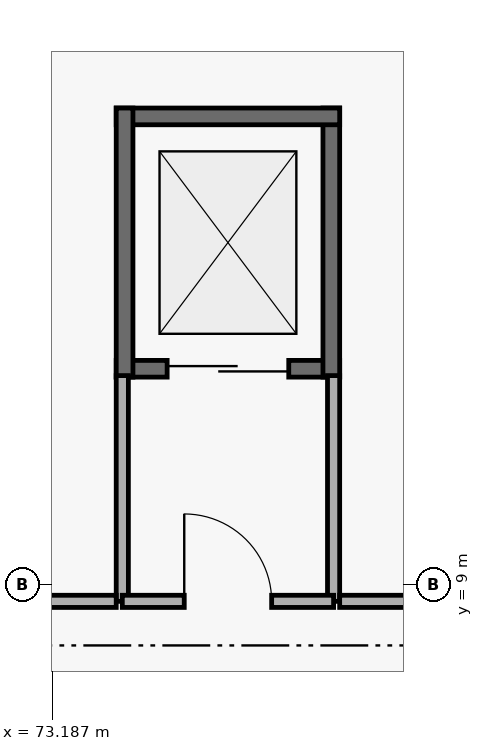
"""IFC4 building model, lengths in metres.
Left out: names, types, materials, properties, quantities, classifications, styles, units other than length and angle.
Written with IfcOpenShell. Run it as: python <this file> out.ifc"""

import sys

from ifc_helpers import new_model, si_unit, direction, frame, frame_2d, origin, place, context, subcontext, project, spatial, rectangle, extrude, element, fill, save


model = new_model("IFC4")
c1 = context("Model", 3, precision=1e-05, world=origin(), true_north=direction((0.0, 1.0)))
c2 = subcontext(c1, "Body", "Model", "MODEL_VIEW")
j1 = project(units=[si_unit("LENGTHUNIT", "METRE"), si_unit("PLANEANGLEUNIT", "RADIAN")], contexts=[c1])
p1 = place(None, origin())
s1 = spatial("IfcSite", under=j1, at=p1, CompositionType="ELEMENT")
p2 = place(p1, origin())
s2 = spatial("IfcBuilding", under=s1, at=p2, CompositionType="ELEMENT")
p3 = place(p2, origin())
s3 = spatial("IfcBuildingStorey", under=s2, at=p3, CompositionType="ELEMENT", Elevation=0.0)
p4 = place(p3, frame((74.03, 11.84, 0.0), z_axis=(0.0, 0.0, 1.0), x_axis=(1.0, 0.0, 0.0)))
e1 = element("IfcWall", 1, at=p4, inside=s3, PredefinedType="SHEAR", context=c2, shape_type="SweptSolid", body=[
    extrude(rectangle(XDim=2.94, YDim=0.22, at=frame_2d((1.47, 0.0))), origin(), (0.0, 0.0, 1.0), 5.1),
])
p5 = place(p4, frame((0.67, 0.0, 0.0)))
e2 = element("IfcOpeningElement", 2, at=p5, cuts=e1, PredefinedType="OPENING", context=c2, shape_type="SweptSolid", body=[
    extrude(rectangle(XDim=1.6, YDim=2.3, at=frame_2d((0.8, 1.15))), frame((0.0, 0.12, 0.0), z_axis=(0.0, -1.0, 0.0), x_axis=(1.0, 0.0, 0.0)), (0.0, 0.0, 1.0), 0.24),
])
p6 = place(p3, frame((76.86, 11.73, 0.0), z_axis=(0.0, 0.0, 1.0), x_axis=(0.0, 1.0, 0.0)))
e3 = element("IfcWall", 3, at=p6, inside=s3, PredefinedType="SHEAR", context=c2, shape_type="SweptSolid", body=[
    extrude(rectangle(XDim=3.54, YDim=0.22, at=frame_2d((1.77, 0.0))), origin(), (0.0, 0.0, 1.0), 5.1),
])
p7 = place(p3, frame((76.97, 15.16, 0.0), z_axis=(0.0, 0.0, 1.0), x_axis=(-1.0, 0.0, 0.0)))
e4 = element("IfcWall", 4, at=p7, inside=s3, PredefinedType="SHEAR", context=c2, shape_type="SweptSolid", body=[
    extrude(rectangle(XDim=2.94, YDim=0.22, at=frame_2d((1.47, 0.0))), origin(), (0.0, 0.0, 1.0), 5.1),
])
p8 = place(p3, frame((74.14, 15.27, 0.0), z_axis=(0.0, 0.0, 1.0), x_axis=(0.0, -1.0, 0.0)))
e5 = element("IfcWall", 5, at=p8, inside=s3, PredefinedType="SHEAR", context=c2, shape_type="SweptSolid", body=[
    extrude(rectangle(XDim=3.54, YDim=0.22, at=frame_2d((1.77, 0.0))), origin(), (0.0, 0.0, 1.0), 5.1),
])
for number, where, z_axis, x_axis in (
    (6, (74.11, 11.75, 0.0), (0.0, 0.0, 1.0), (0.0, -1.0, 0.0)),
    (7, (76.89, 11.75, 0.0), (0.0, 0.0, 1.0), (0.0, -1.0, 0.0)),
):
    element("IfcWall", number, at=place(p3, frame(where, z_axis=z_axis, x_axis=x_axis)), inside=s3, PredefinedType="PARTITIONING", context=c2, shape_type="SweptSolid", body=[
        extrude(rectangle(XDim=2.97, YDim=0.16, at=frame_2d((1.485, 0.0))), origin(), (0.0, 0.0, 1.0), 4.384),
    ])
p9 = place(p3, frame((74.11, 8.78, 0.0), z_axis=(0.0, 0.0, 1.0), x_axis=(1.0, 0.0, 0.0)))
e8 = element("IfcWall", 8, at=p9, inside=s3, PredefinedType="PARTITIONING", context=c2, shape_type="SweptSolid", body=[
    extrude(rectangle(XDim=2.78, YDim=0.16, at=frame_2d((1.39, 0.0))), origin(), (0.0, 0.0, 1.0), 4.384),
])
p10 = place(p9, frame((0.815, 0.0, 0.0)))
e9 = element("IfcOpeningElement", 9, at=p10, cuts=e8, PredefinedType="OPENING", context=c2, shape_type="SweptSolid", body=[
    extrude(rectangle(XDim=1.15, YDim=2.2, at=frame_2d((0.575, 1.1))), frame((0.0, 0.09, 0.0), z_axis=(0.0, -1.0, 0.0), x_axis=(1.0, 0.0, 0.0)), (0.0, 0.0, 1.0), 0.18),
])
p11 = place(p3, frame((71.55, 8.78, 0.0), z_axis=(0.0, 0.0, 1.0), x_axis=(1.0, 0.0, 0.0)))
e10 = element("IfcWall", 10, at=p11, inside=s3, PredefinedType="PARTITIONING", context=c2, shape_type="SweptSolid", body=[
    extrude(rectangle(XDim=2.48, YDim=0.16, at=frame_2d((1.24, 0.0))), origin(), (0.0, 0.0, 1.0), 4.384),
])
p12 = place(p3, frame((76.97, 8.78, 0.0), z_axis=(0.0, 0.0, 1.0), x_axis=(1.0, 0.0, 0.0)))
e11 = element("IfcWall", 11, at=p12, inside=s3, PredefinedType="PARTITIONING", context=c2, shape_type="SweptSolid", body=[
    extrude(rectangle(XDim=4.595, YDim=0.16, at=frame_2d((2.297, 0.0))), origin(), (0.0, 0.0, 1.0), 4.384),
])
p13 = place(p5, origin())
e12 = element("IfcDoor", 12, at=p13, inside=s3, OperationType="SLIDING_TO_LEFT", PredefinedType="DOOR", context=c2, shape_type="SweptSolid", body=[
    extrude(rectangle(XDim=1.6, YDim=2.3, at=frame_2d((0.8, 1.15))), frame((0.0, 0.025, 0.0), z_axis=(0.0, -1.0, 0.0), x_axis=(1.0, 0.0, 0.0)), (0.0, 0.0, 1.0), 0.05),
])
fill(e2, e12)
p14 = place(p10, origin())
e13 = element("IfcDoor", 13, at=p14, inside=s3, OperationType="SINGLE_SWING_LEFT", PredefinedType="DOOR", context=c2, shape_type="SweptSolid", body=[
    extrude(rectangle(XDim=1.15, YDim=2.2, at=frame_2d((0.575, 1.1))), frame((0.0, 0.025, 0.0), z_axis=(0.0, -1.0, 0.0), x_axis=(1.0, 0.0, 0.0)), (0.0, 0.0, 1.0), 0.05),
])
fill(e9, e13)
save(model, sys.argv[1])
